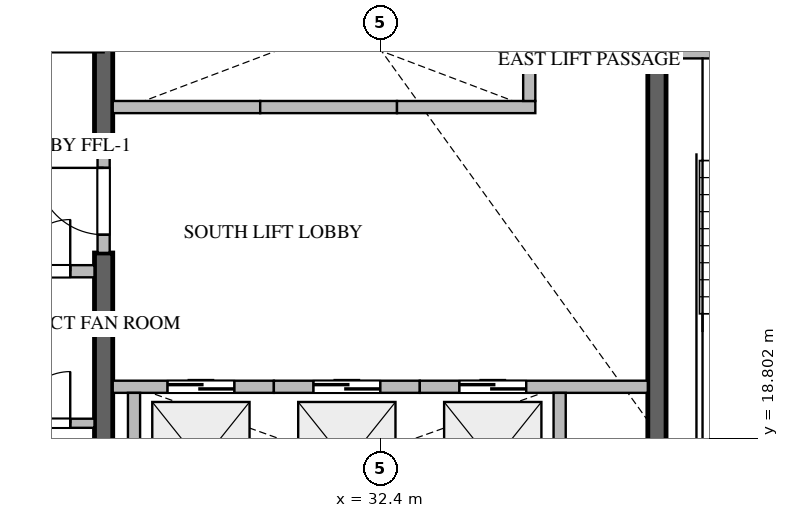
"""IFC4 building model, lengths in metres.
Left out: names, types, materials, properties, quantities, classifications, styles, units other than length and angle.
Written with IfcOpenShell. Run it as: python <this file> out.ifc"""

import sys

from ifc_helpers import new_model, si_unit, direction, frame, frame_2d, origin, place, context, subcontext, project, spatial, rectangle, extrude, source, transform, mapped, element, fill, save


model = new_model("IFC4")
c1 = context("Model", 3, precision=1e-05, world=origin(), true_north=direction((0.0, 1.0)))
c2 = subcontext(c1, "Body", "Model", "MODEL_VIEW")
j1 = project(units=[si_unit("LENGTHUNIT", "METRE"), si_unit("PLANEANGLEUNIT", "RADIAN")], contexts=[c1])
p1 = place(None, origin())
s1 = spatial("IfcSite", under=j1, at=p1, CompositionType="ELEMENT")
p2 = place(p1, origin())
s2 = spatial("IfcBuilding", under=s1, at=p2, CompositionType="ELEMENT")
p3 = place(p2, frame((0.0, 0.0, 75.45)))
s3 = spatial("IfcBuildingStorey", under=s2, at=p3, CompositionType="ELEMENT", Elevation=75.45)
p4 = place(p3, frame((27.85, 17.025, -0.26), z_axis=(0.0, 0.0, 1.0), x_axis=(0.0, 1.0, 0.0)))
e1 = element("IfcWall", 1, at=p4, inside=s3, PredefinedType="SHEAR", context=c2, shape_type="SweptSolid", body=[
    extrude(rectangle(XDim=4.825, YDim=0.3, at=frame_2d((2.413, 0.0))), origin(), (0.0, 0.0, 1.0), 3.748),
])
p5 = place(p3, frame((27.85, 23.55, -0.26), z_axis=(0.0, 0.0, 1.0), x_axis=(0.0, 1.0, 0.0)))
e2 = element("IfcWall", 2, at=p5, inside=s3, PredefinedType="SHEAR", context=c2, shape_type="SweptSolid", body=[
    extrude(rectangle(XDim=9.825, YDim=0.3, at=frame_2d((4.913, 0.0))), origin(), (0.0, 0.0, 1.0), 3.748),
])
p6 = place(p3, frame((36.95, 17.025, -0.26), z_axis=(0.0, 0.0, 1.0), x_axis=(0.0, 1.0, 0.0)))
e3 = element("IfcWall", 3, at=p6, inside=s3, PredefinedType="SHEAR", context=c2, shape_type="SweptSolid", body=[
    extrude(rectangle(XDim=8.325, YDim=0.3, at=frame_2d((4.163, 0.0))), origin(), (0.0, 0.0, 1.0), 3.748),
])
p7 = place(p3, frame((36.95, 25.15, 0.0), z_axis=(0.0, 0.0, 1.0), x_axis=(1.0, 0.0, 0.0)))
e4 = element("IfcWall", 4, at=p7, inside=s3, PredefinedType="STANDARD", context=c2, shape_type="SweptSolid", body=[
    extrude(rectangle(XDim=4.45, YDim=0.2, at=frame_2d((2.225, 0.0))), origin(), (0.0, 0.0, 1.0), 3.49),
])
p8 = place(p7, frame((1.65, 0.0, 0.0)))
e5 = element("IfcOpeningElement", 5, at=p8, cuts=e4, PredefinedType="OPENING", context=c2, shape_type="SweptSolid", body=[
    extrude(rectangle(XDim=1.1, YDim=2.15, at=frame_2d((0.55, 1.075))), frame((0.0, 0.11, 0.0), z_axis=(0.0, -1.0, 0.0), x_axis=(1.0, 0.0, 0.0)), (0.0, 0.0, 1.0), 0.22),
])
p9 = place(p3, frame((28.0, 19.65, 0.0), z_axis=(0.0, 0.0, 1.0), x_axis=(1.0, 0.0, 0.0)))
e6 = element("IfcWall", 6, at=p9, inside=s3, PredefinedType="STANDARD", context=c2, shape_type="SweptSolid", body=[
    extrude(rectangle(XDim=2.65, YDim=0.2, at=frame_2d((1.325, 0.0))), origin(), (0.0, 0.0, 1.0), 3.49),
])
p10 = place(p9, frame((0.9, 0.0, 0.0)))
e7 = element("IfcOpeningElement", 7, at=p10, cuts=e6, PredefinedType="OPENING", context=c2, shape_type="SweptSolid", body=[
    extrude(rectangle(XDim=1.1, YDim=2.2, at=frame_2d((0.55, 1.1))), frame((0.0, 0.11, 0.0), z_axis=(0.0, -1.0, 0.0), x_axis=(1.0, 0.0, 0.0)), (0.0, 0.0, 1.0), 0.22),
])
p11 = place(p3, frame((28.35, 17.025, 0.0), z_axis=(0.0, 0.0, 1.0), x_axis=(0.0, 1.0, 0.0)))
e8 = element("IfcWall", 8, at=p11, inside=s3, PredefinedType="STANDARD", context=c2, shape_type="SweptSolid", body=[
    extrude(rectangle(XDim=2.525, YDim=0.2, at=frame_2d((1.263, 0.0))), origin(), (0.0, 0.0, 1.0), 3.49),
])
p12 = place(p3, frame((30.65, 19.65, 0.0), z_axis=(0.0, 0.0, 1.0), x_axis=(1.0, 0.0, 0.0)))
e9 = element("IfcWall", 9, at=p12, inside=s3, PredefinedType="STANDARD", context=c2, shape_type="SweptSolid", body=[
    extrude(rectangle(XDim=2.4, YDim=0.2, at=frame_2d((1.2, 0.0))), origin(), (0.0, 0.0, 1.0), 3.49),
])
p13 = place(p12, frame((0.65, 0.0, 0.0)))
e10 = element("IfcOpeningElement", 10, at=p13, cuts=e9, PredefinedType="OPENING", context=c2, shape_type="SweptSolid", body=[
    extrude(rectangle(XDim=1.1, YDim=2.2, at=frame_2d((0.55, 1.1))), frame((0.0, 0.11, 0.0), z_axis=(0.0, -1.0, 0.0), x_axis=(1.0, 0.0, 0.0)), (0.0, 0.0, 1.0), 0.22),
])
p14 = place(p3, frame((33.05, 19.65, 0.0), z_axis=(0.0, 0.0, 1.0), x_axis=(1.0, 0.0, 0.0)))
e11 = element("IfcWall", 11, at=p14, inside=s3, PredefinedType="STANDARD", context=c2, shape_type="SweptSolid", body=[
    extrude(rectangle(XDim=3.75, YDim=0.2, at=frame_2d((1.875, 0.0))), origin(), (0.0, 0.0, 1.0), 3.49),
])
p15 = place(p14, frame((0.65, 0.0, 0.0)))
e12 = element("IfcOpeningElement", 12, at=p15, cuts=e11, PredefinedType="OPENING", context=c2, shape_type="SweptSolid", body=[
    extrude(rectangle(XDim=1.1, YDim=2.2, at=frame_2d((0.55, 1.1))), frame((0.0, 0.11, 0.0), z_axis=(0.0, -1.0, 0.0), x_axis=(1.0, 0.0, 0.0)), (0.0, 0.0, 1.0), 0.22),
])
p16 = place(p3, frame((35.35, 17.025, 0.0), z_axis=(0.0, 0.0, 1.0), x_axis=(0.0, 1.0, 0.0)))
e13 = element("IfcWall", 13, at=p16, inside=s3, PredefinedType="STANDARD", context=c2, shape_type="SweptSolid", body=[
    extrude(rectangle(XDim=2.525, YDim=0.2, at=frame_2d((1.263, 0.0))), origin(), (0.0, 0.0, 1.0), 3.49),
])
p17 = place(p3, frame((28.0, 24.25, 0.0), z_axis=(0.0, 0.0, 1.0), x_axis=(1.0, 0.0, 0.0)))
e14 = element("IfcWall", 14, at=p17, inside=s3, PredefinedType="STANDARD", context=c2, shape_type="SweptSolid", body=[
    extrude(rectangle(XDim=2.425, YDim=0.2, at=frame_2d((1.212, 0.0))), origin(), (0.0, 0.0, 1.0), 3.49),
])
p18 = place(p3, frame((30.425, 24.25, 0.0), z_axis=(0.0, 0.0, 1.0), x_axis=(1.0, 0.0, 0.0)))
e15 = element("IfcWall", 15, at=p18, inside=s3, PredefinedType="STANDARD", context=c2, shape_type="SweptSolid", body=[
    extrude(rectangle(XDim=2.25, YDim=0.2, at=frame_2d((1.125, 0.0))), origin(), (0.0, 0.0, 1.0), 3.49),
])
p19 = place(p3, frame((32.675, 24.25, 0.0), z_axis=(0.0, 0.0, 1.0), x_axis=(1.0, 0.0, 0.0)))
e16 = element("IfcWall", 16, at=p19, inside=s3, PredefinedType="STANDARD", context=c2, shape_type="SweptSolid", body=[
    extrude(rectangle(XDim=2.275, YDim=0.2, at=frame_2d((1.137, 0.0))), origin(), (0.0, 0.0, 1.0), 3.49),
])
p20 = place(p3, frame((34.85, 24.35, 0.0), z_axis=(0.0, 0.0, 1.0), x_axis=(0.0, 1.0, 0.0)))
e17 = element("IfcWall", 17, at=p20, inside=s3, PredefinedType="STANDARD", context=c2, shape_type="SweptSolid", body=[
    extrude(rectangle(XDim=2.5, YDim=0.2, at=frame_2d((1.25, 0.0))), origin(), (0.0, 0.0, 1.0), 3.49),
])
p21 = place(p3, frame((26.052, 21.55, 0.0), z_axis=(0.0, 0.0, 1.0), x_axis=(1.0, 0.0, 0.0)))
e18 = element("IfcWall", 18, at=p21, inside=s3, PredefinedType="STANDARD", context=c2, shape_type="SweptSolid", body=[
    extrude(rectangle(XDim=1.648, YDim=0.2, at=frame_2d((0.824, 0.0))), origin(), (0.0, 0.0, 1.0), 3.49),
])
p22 = place(p21, frame((0.399, 0.0, 0.0)))
e19 = element("IfcOpeningElement", 19, at=p22, cuts=e18, PredefinedType="OPENING", context=c2, shape_type="SweptSolid", body=[
    extrude(rectangle(XDim=0.85, YDim=2.1, at=frame_2d((0.425, 1.05))), frame((0.0, 0.11, 0.0), z_axis=(0.0, -1.0, 0.0), x_axis=(1.0, 0.0, 0.0)), (0.0, 0.0, 1.0), 0.22),
])
p23 = place(p3, frame((27.85, 21.852, 0.0), z_axis=(0.0, 0.0, 1.0), x_axis=(0.0, 1.0, 0.0)))
e20 = element("IfcWall", 20, at=p23, inside=s3, PredefinedType="STANDARD", context=c2, shape_type="SweptSolid", body=[
    extrude(rectangle(XDim=1.696, YDim=0.2, at=frame_2d((0.848, 0.0))), origin(), (0.0, 0.0, 1.0), 3.49),
])
p24 = place(p23, frame((0.298, 0.0, 0.0)))
e21 = element("IfcOpeningElement", 21, at=p24, cuts=e20, PredefinedType="OPENING", context=c2, shape_type="SweptSolid", body=[
    extrude(rectangle(XDim=1.1, YDim=2.15, at=frame_2d((0.55, 1.075))), frame((0.0, 0.11, 0.0), z_axis=(0.0, -1.0, 0.0), x_axis=(1.0, 0.0, 0.0)), (0.0, 0.0, 1.0), 0.22),
])
p25 = place(p3, frame((26.052, 19.05, 0.0), z_axis=(0.0, 0.0, 1.0), x_axis=(1.0, 0.0, 0.0)))
e22 = element("IfcWall", 22, at=p25, inside=s3, PredefinedType="PARTITIONING", context=c2, shape_type="SweptSolid", body=[
    extrude(rectangle(XDim=1.648, YDim=0.15, at=frame_2d((0.824, 0.0))), origin(), (0.0, 0.0, 1.0), 3.49),
])
p26 = place(p25, frame((0.399, 0.0, 0.0)))
e23 = element("IfcOpeningElement", 23, at=p26, cuts=e22, PredefinedType="OPENING", context=c2, shape_type="SweptSolid", body=[
    extrude(rectangle(XDim=0.85, YDim=2.1, at=frame_2d((0.425, 1.05))), frame((0.0, 0.085, 0.0), z_axis=(0.0, -1.0, 0.0), x_axis=(1.0, 0.0, 0.0)), (0.0, 0.0, 1.0), 0.17),
])
m1 = source(origin(), c2, "Body", "SweptSolid", [
    extrude(rectangle(XDim=1.1, YDim=2.2, at=frame_2d((0.55, 1.1))), frame((0.0, 0.025, 0.0), z_axis=(0.0, -1.0, 0.0), x_axis=(1.0, 0.0, 0.0)), (0.0, 0.0, 1.0), 0.05),
])
p27 = place(p10, origin())
e24 = element("IfcDoor", 24, at=p27, inside=s3, OperationType="DOUBLE_DOOR_SLIDING", PredefinedType="DOOR", context=c2, shape_type="MappedRepresentation", body=[
    mapped(m1, transform((0.0, 0.0, 0.0), scale=1.0)),
])
fill(e7, e24)
p28 = place(p13, origin())
e25 = element("IfcDoor", 25, at=p28, inside=s3, OperationType="DOUBLE_DOOR_SLIDING", PredefinedType="DOOR", context=c2, shape_type="MappedRepresentation", body=[
    mapped(m1, transform((0.0, 0.0, 0.0), scale=1.0)),
])
fill(e10, e25)
p29 = place(p15, origin())
e26 = element("IfcDoor", 26, at=p29, inside=s3, OperationType="DOUBLE_DOOR_SLIDING", PredefinedType="DOOR", context=c2, shape_type="MappedRepresentation", body=[
    mapped(m1, transform((0.0, 0.0, 0.0), scale=1.0)),
])
fill(e12, e26)
m2 = source(origin(), c2, "Body", "SweptSolid", [
    extrude(rectangle(XDim=0.85, YDim=2.1, at=frame_2d((0.425, 1.05))), frame((0.0, 0.025, 0.0), z_axis=(0.0, -1.0, 0.0), x_axis=(1.0, 0.0, 0.0)), (0.0, 0.0, 1.0), 0.05),
])
p30 = place(p22, origin())
e27 = element("IfcDoor", 27, at=p30, inside=s3, OperationType="SINGLE_SWING_RIGHT", PredefinedType="DOOR", context=c2, shape_type="MappedRepresentation", body=[
    mapped(m2, transform((0.0, 0.0, 0.0), scale=1.0)),
])
fill(e19, e27)
m3 = source(origin(), c2, "Body", "SweptSolid", [
    extrude(rectangle(XDim=1.1, YDim=2.15, at=frame_2d((0.55, 1.075))), frame((0.0, 0.025, 0.0), z_axis=(0.0, -1.0, 0.0), x_axis=(1.0, 0.0, 0.0)), (0.0, 0.0, 1.0), 0.05),
])
p31 = place(p24, origin())
e28 = element("IfcDoor", 28, at=p31, inside=s3, OperationType="SINGLE_SWING_RIGHT", PredefinedType="DOOR", context=c2, shape_type="MappedRepresentation", body=[
    mapped(m3, transform((0.0, 0.0, 0.0), scale=1.0)),
])
fill(e21, e28)
p32 = place(p26, origin())
e29 = element("IfcDoor", 29, at=p32, inside=s3, OperationType="SINGLE_SWING_RIGHT", PredefinedType="DOOR", context=c2, shape_type="MappedRepresentation", body=[
    mapped(m2, transform((0.0, 0.0, 0.0), scale=1.0)),
])
fill(e23, e29)
save(model, sys.argv[1])
